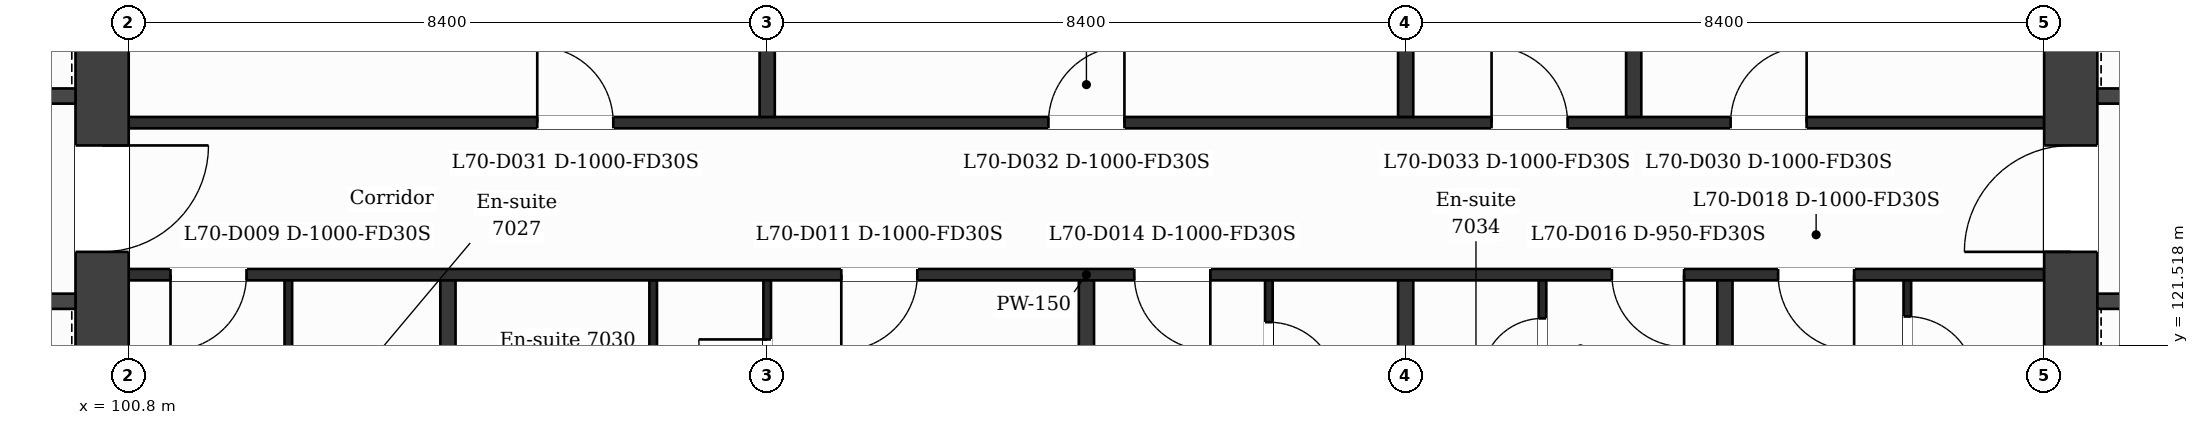
"""IFC4 building model, lengths in metres.
Left out: names, types, materials, properties, quantities, classifications, styles, units other than length and angle.
Written with IfcOpenShell. Run it as: python <this file> out.ifc"""

import sys

from ifc_helpers import new_model, si_unit, direction, frame, frame_2d, origin, place, context, subcontext, project, spatial, rectangle, extrude, element, fill, save


model = new_model("IFC4")
c1 = context("Model", 3, precision=1e-05, world=origin(), true_north=direction((0.0, 1.0)))
c2 = subcontext(c1, "Body", "Model", "MODEL_VIEW")
j1 = project(units=[si_unit("LENGTHUNIT", "METRE"), si_unit("PLANEANGLEUNIT", "RADIAN")], contexts=[c1])
p1 = place(None, origin())
s1 = spatial("IfcSite", under=j1, at=p1, CompositionType="ELEMENT")
p2 = place(p1, origin())
s2 = spatial("IfcBuilding", under=s1, at=p2, CompositionType="ELEMENT")
p3 = place(p2, frame((0.0, 0.0, 288.6)))
s3 = spatial("IfcBuildingStorey", under=s2, at=p3, CompositionType="ELEMENT", Elevation=288.6)
p4 = place(p3, frame((100.45, 132.05, 0.0), z_axis=(0.0, 0.0, 1.0), x_axis=(0.0, -1.0, 0.0)))
e1 = element("IfcWall", 1, at=p4, inside=s3, PredefinedType="SHEAR", context=c2, shape_type="SweptSolid", body=[
    extrude(rectangle(XDim=15.7, YDim=0.7, at=frame_2d((7.85, 0.0))), origin(), (0.0, 0.0, 1.0), 3.7),
])
p5 = place(p4, frame((7.9, 0.0, 0.0)))
e2 = element("IfcOpeningElement", 2, at=p5, cuts=e1, PredefinedType="OPENING", context=c2, shape_type="SweptSolid", body=[
    extrude(rectangle(XDim=1.4, YDim=2.1, at=frame_2d((0.7, 1.05))), frame((0.0, 0.36, 0.0), z_axis=(0.0, -1.0, 0.0), x_axis=(1.0, 0.0, 0.0)), (0.0, 0.0, 1.0), 0.72),
])
p6 = place(p3, frame((126.35, 116.35, 0.0), z_axis=(0.0, 0.0, 1.0), x_axis=(0.0, 1.0, 0.0)))
e3 = element("IfcWall", 3, at=p6, inside=s3, PredefinedType="SHEAR", context=c2, shape_type="SweptSolid", body=[
    extrude(rectangle(XDim=15.7, YDim=0.7, at=frame_2d((7.85, 0.0))), origin(), (0.0, 0.0, 1.0), 3.7),
])
p7 = place(p6, frame((6.4, 0.0, 0.0)))
e4 = element("IfcOpeningElement", 4, at=p7, cuts=e3, PredefinedType="OPENING", context=c2, shape_type="SweptSolid", body=[
    extrude(rectangle(XDim=1.4, YDim=2.1, at=frame_2d((0.7, 1.05))), frame((0.0, 0.36, 0.0), z_axis=(0.0, -1.0, 0.0), x_axis=(1.0, 0.0, 0.0)), (0.0, 0.0, 1.0), 0.72),
])
p8 = place(p3, frame((95.227, 122.1, 0.0), z_axis=(0.0, 0.0, 1.0), x_axis=(1.0, 0.0, 0.0)))
e5 = element("IfcWall", 5, at=p8, inside=s3, PredefinedType="PARTITIONING", context=c2, shape_type="SweptSolid", body=[
    extrude(rectangle(XDim=4.873, YDim=0.2, at=frame_2d((2.437, 0.0))), origin(), (0.0, 0.0, 1.0), 3.38),
])
p9 = place(p8, frame((0.605, 0.0, 0.0)))
e6 = element("IfcOpeningElement", 6, at=p9, cuts=e5, PredefinedType="OPENING", context=c2, shape_type="SweptSolid", body=[
    extrude(rectangle(XDim=1.1, YDim=2.1, at=frame_2d((0.55, 1.05))), frame((0.0, 0.11, 0.0), z_axis=(0.0, -1.0, 0.0), x_axis=(1.0, 0.0, 0.0)), (0.0, 0.0, 1.0), 0.22),
])
p10 = place(p8, frame((2.946, 0.0, 0.0)))
e7 = element("IfcOpeningElement", 7, at=p10, cuts=e5, PredefinedType="OPENING", context=c2, shape_type="SweptSolid", body=[
    extrude(rectangle(XDim=1.1, YDim=2.1, at=frame_2d((0.55, 1.05))), frame((0.0, 0.11, 0.0), z_axis=(0.0, -1.0, 0.0), x_axis=(1.0, 0.0, 0.0)), (0.0, 0.0, 1.0), 0.22),
])
p11 = place(p3, frame((126.7, 122.1, 0.0), z_axis=(0.0, 0.0, 1.0), x_axis=(1.0, 0.0, 0.0)))
e8 = element("IfcWall", 8, at=p11, inside=s3, PredefinedType="PARTITIONING", context=c2, shape_type="SweptSolid", body=[
    extrude(rectangle(XDim=4.873, YDim=0.2, at=frame_2d((2.437, 0.0))), origin(), (0.0, 0.0, 1.0), 3.38),
])
p12 = place(p11, frame((3.105, 0.0, 0.0)))
e9 = element("IfcOpeningElement", 9, at=p12, cuts=e8, PredefinedType="OPENING", context=c2, shape_type="SweptSolid", body=[
    extrude(rectangle(XDim=1.1, YDim=2.1, at=frame_2d((0.55, 1.05))), frame((0.0, 0.11, 0.0), z_axis=(0.0, -1.0, 0.0), x_axis=(1.0, 0.0, 0.0)), (0.0, 0.0, 1.0), 0.22),
])
p13 = place(p11, frame((0.732, 0.0, 0.0)))
e10 = element("IfcOpeningElement", 10, at=p13, cuts=e8, PredefinedType="OPENING", context=c2, shape_type="SweptSolid", body=[
    extrude(rectangle(XDim=1.1, YDim=2.1, at=frame_2d((0.55, 1.05))), frame((0.0, 0.11, 0.0), z_axis=(0.0, -1.0, 0.0), x_axis=(1.0, 0.0, 0.0)), (0.0, 0.0, 1.0), 0.22),
])
p14 = place(p3, frame((100.8, 122.45, 0.0), z_axis=(0.0, 0.0, 1.0), x_axis=(1.0, 0.0, 0.0)))
e11 = element("IfcWall", 11, at=p14, inside=s3, PredefinedType="PARTITIONING", context=c2, shape_type="SweptSolid", body=[
    extrude(rectangle(XDim=25.2, YDim=0.15, at=frame_2d((12.6, 0.0))), origin(), (0.0, 0.0, 1.0), 3.38),
])
p15 = place(p14, frame((0.55, 0.0, 0.0)))
e12 = element("IfcOpeningElement", 12, at=p15, cuts=e11, PredefinedType="OPENING", context=c2, shape_type="SweptSolid", body=[
    extrude(rectangle(XDim=1.0, YDim=2.1, at=frame_2d((0.5, 1.05))), frame((0.0, 0.085, 0.0), z_axis=(0.0, -1.0, 0.0), x_axis=(1.0, 0.0, 0.0)), (0.0, 0.0, 1.0), 0.17),
])
p16 = place(p14, frame((9.375, 0.0, 0.0)))
e13 = element("IfcOpeningElement", 13, at=p16, cuts=e11, PredefinedType="OPENING", context=c2, shape_type="SweptSolid", body=[
    extrude(rectangle(XDim=1.0, YDim=2.1, at=frame_2d((0.5, 1.05))), frame((0.0, 0.085, 0.0), z_axis=(0.0, -1.0, 0.0), x_axis=(1.0, 0.0, 0.0)), (0.0, 0.0, 1.0), 0.17),
])
p17 = place(p14, frame((13.23, 0.0, 0.0)))
e14 = element("IfcOpeningElement", 14, at=p17, cuts=e11, PredefinedType="OPENING", context=c2, shape_type="SweptSolid", body=[
    extrude(rectangle(XDim=1.0, YDim=2.1, at=frame_2d((0.5, 1.05))), frame((0.0, 0.085, 0.0), z_axis=(0.0, -1.0, 0.0), x_axis=(1.0, 0.0, 0.0)), (0.0, 0.0, 1.0), 0.17),
])
p18 = place(p14, frame((19.513, 0.0, 0.0)))
e15 = element("IfcOpeningElement", 15, at=p18, cuts=e11, PredefinedType="OPENING", context=c2, shape_type="SweptSolid", body=[
    extrude(rectangle(XDim=0.95, YDim=2.1, at=frame_2d((0.475, 1.05))), frame((0.0, 0.085, 0.0), z_axis=(0.0, -1.0, 0.0), x_axis=(1.0, 0.0, 0.0)), (0.0, 0.0, 1.0), 0.17),
])
p19 = place(p14, frame((21.7, 0.0, 0.0)))
e16 = element("IfcOpeningElement", 16, at=p19, cuts=e11, PredefinedType="OPENING", context=c2, shape_type="SweptSolid", body=[
    extrude(rectangle(XDim=1.0, YDim=2.1, at=frame_2d((0.5, 1.05))), frame((0.0, 0.085, 0.0), z_axis=(0.0, -1.0, 0.0), x_axis=(1.0, 0.0, 0.0)), (0.0, 0.0, 1.0), 0.17),
])
p20 = place(p3, frame((100.8, 124.45, 0.0), z_axis=(0.0, 0.0, 1.0), x_axis=(1.0, 0.0, 0.0)))
e17 = element("IfcWall", 17, at=p20, inside=s3, PredefinedType="PARTITIONING", context=c2, shape_type="SweptSolid", body=[
    extrude(rectangle(XDim=25.2, YDim=0.15, at=frame_2d((12.6, 0.0))), origin(), (0.0, 0.0, 1.0), 3.38),
])
p21 = place(p20, frame((21.075, 0.0, 0.0)))
e18 = element("IfcOpeningElement", 18, at=p21, cuts=e17, PredefinedType="OPENING", context=c2, shape_type="SweptSolid", body=[
    extrude(rectangle(XDim=1.0, YDim=2.1, at=frame_2d((0.5, 1.05))), frame((0.0, 0.085, 0.0), z_axis=(0.0, -1.0, 0.0), x_axis=(1.0, 0.0, 0.0)), (0.0, 0.0, 1.0), 0.17),
])
p22 = place(p20, frame((5.375, 0.0, 0.0)))
e19 = element("IfcOpeningElement", 19, at=p22, cuts=e17, PredefinedType="OPENING", context=c2, shape_type="SweptSolid", body=[
    extrude(rectangle(XDim=1.0, YDim=2.1, at=frame_2d((0.5, 1.05))), frame((0.0, 0.085, 0.0), z_axis=(0.0, -1.0, 0.0), x_axis=(1.0, 0.0, 0.0)), (0.0, 0.0, 1.0), 0.17),
])
p23 = place(p20, frame((12.1, 0.0, 0.0)))
e20 = element("IfcOpeningElement", 20, at=p23, cuts=e17, PredefinedType="OPENING", context=c2, shape_type="SweptSolid", body=[
    extrude(rectangle(XDim=1.0, YDim=2.1, at=frame_2d((0.5, 1.05))), frame((0.0, 0.085, 0.0), z_axis=(0.0, -1.0, 0.0), x_axis=(1.0, 0.0, 0.0)), (0.0, 0.0, 1.0), 0.17),
])
p24 = place(p20, frame((17.93, 0.0, 0.0)))
e21 = element("IfcOpeningElement", 21, at=p24, cuts=e17, PredefinedType="OPENING", context=c2, shape_type="SweptSolid", body=[
    extrude(rectangle(XDim=1.0, YDim=2.1, at=frame_2d((0.5, 1.05))), frame((0.0, 0.085, 0.0), z_axis=(0.0, -1.0, 0.0), x_axis=(1.0, 0.0, 0.0)), (0.0, 0.0, 1.0), 0.17),
])
p25 = place(p3, frame((92.702, 124.8, 0.0), z_axis=(0.0, 0.0, 1.0), x_axis=(1.0, 0.0, 0.0)))
e22 = element("IfcWall", 22, at=p25, inside=s3, PredefinedType="PARTITIONING", context=c2, shape_type="SweptSolid", body=[
    extrude(rectangle(XDim=7.398, YDim=0.2, at=frame_2d((3.699, 0.0))), origin(), (0.0, 0.0, 1.0), 3.38),
])
p26 = place(p25, frame((5.573, 0.0, 0.0)))
e23 = element("IfcOpeningElement", 23, at=p26, cuts=e22, PredefinedType="OPENING", context=c2, shape_type="SweptSolid", body=[
    extrude(rectangle(XDim=1.1, YDim=2.1, at=frame_2d((0.55, 1.05))), frame((0.0, 0.11, 0.0), z_axis=(0.0, -1.0, 0.0), x_axis=(1.0, 0.0, 0.0)), (0.0, 0.0, 1.0), 0.22),
])
p27 = place(p3, frame((126.7, 124.8, 0.0), z_axis=(0.0, 0.0, 1.0), x_axis=(1.0, 0.0, 0.0)))
e24 = element("IfcWall", 24, at=p27, inside=s3, PredefinedType="PARTITIONING", context=c2, shape_type="SweptSolid", body=[
    extrude(rectangle(XDim=4.849, YDim=0.2, at=frame_2d((2.424, 0.0))), origin(), (0.0, 0.0, 1.0), 3.38),
])
p28 = place(p27, frame((0.725, 0.0, 0.0)))
e25 = element("IfcOpeningElement", 25, at=p28, cuts=e24, PredefinedType="OPENING", context=c2, shape_type="SweptSolid", body=[
    extrude(rectangle(XDim=1.1, YDim=2.1, at=frame_2d((0.55, 1.05))), frame((0.0, 0.11, 0.0), z_axis=(0.0, -1.0, 0.0), x_axis=(1.0, 0.0, 0.0)), (0.0, 0.0, 1.0), 0.22),
])
p29 = place(p3, frame((102.9, 120.1, 0.0), z_axis=(0.0, 0.0, 1.0), x_axis=(0.0, 1.0, 0.0)))
e26 = element("IfcWall", 26, at=p29, inside=s3, PredefinedType="PARTITIONING", context=c2, shape_type="SweptSolid", body=[
    extrude(rectangle(XDim=2.275, YDim=0.1, at=frame_2d((1.137, 0.0))), origin(), (0.0, 0.0, 1.0), 3.38),
])
p30 = place(p29, frame((0.5, 0.0, 0.0)))
e27 = element("IfcOpeningElement", 27, at=p30, cuts=e26, PredefinedType="OPENING", context=c2, shape_type="SweptSolid", body=[
    extrude(rectangle(XDim=0.9, YDim=2.1, at=frame_2d((0.45, 1.05))), frame((0.0, 0.06, 0.0), z_axis=(0.0, -1.0, 0.0), x_axis=(1.0, 0.0, 0.0)), (0.0, 0.0, 1.0), 0.12),
])
p31 = place(p3, frame((105.0, 117.79, 0.0), z_axis=(0.0, 0.0, 1.0), x_axis=(0.0, 1.0, 0.0)))
e28 = element("IfcWall", 28, at=p31, inside=s3, PredefinedType="PARTITIONING", context=c2, shape_type="SweptSolid", body=[
    extrude(rectangle(XDim=4.585, YDim=0.2, at=frame_2d((2.292, 0.0))), origin(), (0.0, 0.0, 1.0), 3.38),
])
p32 = place(p3, frame((107.7, 120.1, 0.0), z_axis=(0.0, 0.0, 1.0), x_axis=(0.0, 1.0, 0.0)))
e29 = element("IfcWall", 29, at=p32, inside=s3, PredefinedType="PARTITIONING", context=c2, shape_type="SweptSolid", body=[
    extrude(rectangle(XDim=2.275, YDim=0.1, at=frame_2d((1.137, 0.0))), origin(), (0.0, 0.0, 1.0), 3.38),
])
p33 = place(p3, frame((109.2, 117.79, 0.0), z_axis=(0.0, 0.0, 1.0), x_axis=(0.0, 1.0, 0.0)))
e30 = element("IfcWall", 30, at=p33, inside=s3, PredefinedType="PARTITIONING", context=c2, shape_type="SweptSolid", body=[
    extrude(rectangle(XDim=4.585, YDim=0.1, at=frame_2d((2.292, 0.0))), origin(), (0.0, 0.0, 1.0), 3.38),
])
p34 = place(p33, frame((2.908, 0.0, 0.0)))
e31 = element("IfcOpeningElement", 31, at=p34, cuts=e30, PredefinedType="OPENING", context=c2, shape_type="SweptSolid", body=[
    extrude(rectangle(XDim=0.9, YDim=2.1, at=frame_2d((0.45, 1.05))), frame((0.0, 0.06, 0.0), z_axis=(0.0, -1.0, 0.0), x_axis=(1.0, 0.0, 0.0)), (0.0, 0.0, 1.0), 0.12),
])
p35 = place(p3, frame((109.2, 124.525, 0.0), z_axis=(0.0, 0.0, 1.0), x_axis=(0.0, 1.0, 0.0)))
e32 = element("IfcWall", 32, at=p35, inside=s3, PredefinedType="PARTITIONING", context=c2, shape_type="SweptSolid", body=[
    extrude(rectangle(XDim=9.2, YDim=0.2, at=frame_2d((4.6, 0.0))), origin(), (0.0, 0.0, 1.0), 3.38),
])
p36 = place(p3, frame((113.4, 117.79, 0.0), z_axis=(0.0, 0.0, 1.0), x_axis=(0.0, 1.0, 0.0)))
e33 = element("IfcWall", 33, at=p36, inside=s3, PredefinedType="PARTITIONING", context=c2, shape_type="SweptSolid", body=[
    extrude(rectangle(XDim=4.585, YDim=0.2, at=frame_2d((2.292, 0.0))), origin(), (0.0, 0.0, 1.0), 3.38),
])
p37 = place(p3, frame((115.8, 119.8, 0.0), z_axis=(0.0, 0.0, 1.0), x_axis=(0.0, 1.0, 0.0)))
e34 = element("IfcWall", 34, at=p37, inside=s3, PredefinedType="PARTITIONING", context=c2, shape_type="SweptSolid", body=[
    extrude(rectangle(XDim=2.575, YDim=0.1, at=frame_2d((1.288, 0.0))), origin(), (0.0, 0.0, 1.0), 3.38),
])
p38 = place(p37, frame((1.125, 0.0, 0.0)))
e35 = element("IfcOpeningElement", 35, at=p38, cuts=e34, PredefinedType="OPENING", context=c2, shape_type="SweptSolid", body=[
    extrude(rectangle(XDim=0.9, YDim=2.1, at=frame_2d((0.45, 1.05))), frame((0.0, 0.06, 0.0), z_axis=(0.0, -1.0, 0.0), x_axis=(1.0, 0.0, 0.0)), (0.0, 0.0, 1.0), 0.12),
])
p39 = place(p3, frame((117.6, 117.79, 0.0), z_axis=(0.0, 0.0, 1.0), x_axis=(0.0, 1.0, 0.0)))
e36 = element("IfcWall", 36, at=p39, inside=s3, PredefinedType="PARTITIONING", context=c2, shape_type="SweptSolid", body=[
    extrude(rectangle(XDim=4.585, YDim=0.2, at=frame_2d((2.292, 0.0))), origin(), (0.0, 0.0, 1.0), 3.38),
])
p40 = place(p3, frame((117.6, 124.525, 0.0), z_axis=(0.0, 0.0, 1.0), x_axis=(0.0, 1.0, 0.0)))
e37 = element("IfcWall", 37, at=p40, inside=s3, PredefinedType="PARTITIONING", context=c2, shape_type="SweptSolid", body=[
    extrude(rectangle(XDim=9.2, YDim=0.2, at=frame_2d((4.6, 0.0))), origin(), (0.0, 0.0, 1.0), 3.38),
])
p41 = place(p3, frame((119.4, 120.1, 0.0), z_axis=(0.0, 0.0, 1.0), x_axis=(0.0, 1.0, 0.0)))
e38 = element("IfcWall", 38, at=p41, inside=s3, PredefinedType="PARTITIONING", context=c2, shape_type="SweptSolid", body=[
    extrude(rectangle(XDim=2.275, YDim=0.1, at=frame_2d((1.137, 0.0))), origin(), (0.0, 0.0, 1.0), 3.38),
])
p42 = place(p41, frame((0.975, 0.0, 0.0)))
e39 = element("IfcOpeningElement", 39, at=p42, cuts=e38, PredefinedType="OPENING", context=c2, shape_type="SweptSolid", body=[
    extrude(rectangle(XDim=0.8, YDim=2.1, at=frame_2d((0.4, 1.05))), frame((0.0, 0.06, 0.0), z_axis=(0.0, -1.0, 0.0), x_axis=(1.0, 0.0, 0.0)), (0.0, 0.0, 1.0), 0.12),
])
p43 = place(p3, frame((120.6, 124.525, 0.0), z_axis=(0.0, 0.0, 1.0), x_axis=(0.0, 1.0, 0.0)))
e40 = element("IfcWall", 40, at=p43, inside=s3, PredefinedType="PARTITIONING", context=c2, shape_type="SweptSolid", body=[
    extrude(rectangle(XDim=5.825, YDim=0.2, at=frame_2d((2.913, 0.0))), origin(), (0.0, 0.0, 1.0), 3.38),
])
p44 = place(p3, frame((121.8, 117.79, 0.0), z_axis=(0.0, 0.0, 1.0), x_axis=(0.0, 1.0, 0.0)))
e41 = element("IfcWall", 41, at=p44, inside=s3, PredefinedType="PARTITIONING", context=c2, shape_type="SweptSolid", body=[
    extrude(rectangle(XDim=4.585, YDim=0.2, at=frame_2d((2.292, 0.0))), origin(), (0.0, 0.0, 1.0), 3.38),
])
p45 = place(p3, frame((124.2, 120.1, 0.0), z_axis=(0.0, 0.0, 1.0), x_axis=(0.0, 1.0, 0.0)))
e42 = element("IfcWall", 42, at=p45, inside=s3, PredefinedType="PARTITIONING", context=c2, shape_type="SweptSolid", body=[
    extrude(rectangle(XDim=2.275, YDim=0.1, at=frame_2d((1.137, 0.0))), origin(), (0.0, 0.0, 1.0), 3.38),
])
p46 = place(p45, frame((0.9, 0.0, 0.0)))
e43 = element("IfcOpeningElement", 43, at=p46, cuts=e42, PredefinedType="OPENING", context=c2, shape_type="SweptSolid", body=[
    extrude(rectangle(XDim=0.9, YDim=2.1, at=frame_2d((0.45, 1.05))), frame((0.0, 0.06, 0.0), z_axis=(0.0, -1.0, 0.0), x_axis=(1.0, 0.0, 0.0)), (0.0, 0.0, 1.0), 0.12),
])
p47 = place(p15, origin())
e44 = element("IfcDoor", 44, at=p47, inside=s3, OperationType="SINGLE_SWING_LEFT", PredefinedType="DOOR", context=c2, shape_type="SweptSolid", body=[
    extrude(rectangle(XDim=1.0, YDim=2.1, at=frame_2d((0.5, 1.05))), frame((0.0, 0.025, 0.0), z_axis=(0.0, -1.0, 0.0), x_axis=(1.0, 0.0, 0.0)), (0.0, 0.0, 1.0), 0.05),
])
fill(e12, e44)
p48 = place(p16, origin())
e45 = element("IfcDoor", 45, at=p48, inside=s3, OperationType="SINGLE_SWING_LEFT", PredefinedType="DOOR", context=c2, shape_type="SweptSolid", body=[
    extrude(rectangle(XDim=1.0, YDim=2.1, at=frame_2d((0.5, 1.05))), frame((0.0, 0.025, 0.0), z_axis=(0.0, -1.0, 0.0), x_axis=(1.0, 0.0, 0.0)), (0.0, 0.0, 1.0), 0.05),
])
fill(e13, e45)
p49 = place(p34, origin())
e46 = element("IfcDoor", 46, at=p49, inside=s3, OperationType="SINGLE_SWING_RIGHT", PredefinedType="DOOR", context=c2, shape_type="SweptSolid", body=[
    extrude(rectangle(XDim=0.9, YDim=2.1, at=frame_2d((0.45, 1.05))), frame((0.0, 0.025, 0.0), z_axis=(0.0, -1.0, 0.0), x_axis=(1.0, 0.0, 0.0)), (0.0, 0.0, 1.0), 0.05),
])
fill(e31, e46)
p50 = place(p17, origin())
e47 = element("IfcDoor", 47, at=p50, inside=s3, OperationType="SINGLE_SWING_RIGHT", PredefinedType="DOOR", context=c2, shape_type="SweptSolid", body=[
    extrude(rectangle(XDim=1.0, YDim=2.1, at=frame_2d((0.5, 1.05))), frame((0.0, 0.025, 0.0), z_axis=(0.0, -1.0, 0.0), x_axis=(1.0, 0.0, 0.0)), (0.0, 0.0, 1.0), 0.05),
])
fill(e14, e47)
p51 = place(p38, origin())
e48 = element("IfcDoor", 48, at=p51, inside=s3, OperationType="SINGLE_SWING_LEFT", PredefinedType="DOOR", context=c2, shape_type="SweptSolid", body=[
    extrude(rectangle(XDim=0.9, YDim=2.1, at=frame_2d((0.45, 1.05))), frame((0.0, 0.025, 0.0), z_axis=(0.0, -1.0, 0.0), x_axis=(1.0, 0.0, 0.0)), (0.0, 0.0, 1.0), 0.05),
])
fill(e35, e48)
p52 = place(p18, origin())
e49 = element("IfcDoor", 49, at=p52, inside=s3, OperationType="SINGLE_SWING_RIGHT", PredefinedType="DOOR", context=c2, shape_type="SweptSolid", body=[
    extrude(rectangle(XDim=0.95, YDim=2.1, at=frame_2d((0.475, 1.05))), frame((0.0, 0.025, 0.0), z_axis=(0.0, -1.0, 0.0), x_axis=(1.0, 0.0, 0.0)), (0.0, 0.0, 1.0), 0.05),
])
fill(e15, e49)
p53 = place(p42, origin())
e50 = element("IfcDoor", 50, at=p53, inside=s3, OperationType="SINGLE_SWING_LEFT", PredefinedType="DOOR", context=c2, shape_type="SweptSolid", body=[
    extrude(rectangle(XDim=0.8, YDim=2.1, at=frame_2d((0.4, 1.05))), frame((0.0, 0.025, 0.0), z_axis=(0.0, -1.0, 0.0), x_axis=(1.0, 0.0, 0.0)), (0.0, 0.0, 1.0), 0.05),
])
fill(e39, e50)
p54 = place(p19, origin())
e51 = element("IfcDoor", 51, at=p54, inside=s3, OperationType="SINGLE_SWING_RIGHT", PredefinedType="DOOR", context=c2, shape_type="SweptSolid", body=[
    extrude(rectangle(XDim=1.0, YDim=2.1, at=frame_2d((0.5, 1.05))), frame((0.0, 0.025, 0.0), z_axis=(0.0, -1.0, 0.0), x_axis=(1.0, 0.0, 0.0)), (0.0, 0.0, 1.0), 0.05),
])
fill(e16, e51)
p55 = place(p46, origin())
e52 = element("IfcDoor", 52, at=p55, inside=s3, OperationType="SINGLE_SWING_LEFT", PredefinedType="DOOR", context=c2, shape_type="SweptSolid", body=[
    extrude(rectangle(XDim=0.9, YDim=2.1, at=frame_2d((0.45, 1.05))), frame((0.0, 0.025, 0.0), z_axis=(0.0, -1.0, 0.0), x_axis=(1.0, 0.0, 0.0)), (0.0, 0.0, 1.0), 0.05),
])
fill(e43, e52)
p56 = place(p21, origin())
e53 = element("IfcDoor", 53, at=p56, inside=s3, OperationType="SINGLE_SWING_RIGHT", PredefinedType="DOOR", context=c2, shape_type="SweptSolid", body=[
    extrude(rectangle(XDim=1.0, YDim=2.1, at=frame_2d((0.5, 1.05))), frame((0.0, 0.025, 0.0), z_axis=(0.0, -1.0, 0.0), x_axis=(1.0, 0.0, 0.0)), (0.0, 0.0, 1.0), 0.05),
])
fill(e18, e53)
p57 = place(p22, origin())
e54 = element("IfcDoor", 54, at=p57, inside=s3, OperationType="SINGLE_SWING_LEFT", PredefinedType="DOOR", context=c2, shape_type="SweptSolid", body=[
    extrude(rectangle(XDim=1.0, YDim=2.1, at=frame_2d((0.5, 1.05))), frame((0.0, 0.025, 0.0), z_axis=(0.0, -1.0, 0.0), x_axis=(1.0, 0.0, 0.0)), (0.0, 0.0, 1.0), 0.05),
])
fill(e19, e54)
p58 = place(p23, origin())
e55 = element("IfcDoor", 55, at=p58, inside=s3, OperationType="SINGLE_SWING_RIGHT", PredefinedType="DOOR", context=c2, shape_type="SweptSolid", body=[
    extrude(rectangle(XDim=1.0, YDim=2.1, at=frame_2d((0.5, 1.05))), frame((0.0, 0.025, 0.0), z_axis=(0.0, -1.0, 0.0), x_axis=(1.0, 0.0, 0.0)), (0.0, 0.0, 1.0), 0.05),
])
fill(e20, e55)
p59 = place(p24, origin())
e56 = element("IfcDoor", 56, at=p59, inside=s3, OperationType="SINGLE_SWING_LEFT", PredefinedType="DOOR", context=c2, shape_type="SweptSolid", body=[
    extrude(rectangle(XDim=1.0, YDim=2.1, at=frame_2d((0.5, 1.05))), frame((0.0, 0.025, 0.0), z_axis=(0.0, -1.0, 0.0), x_axis=(1.0, 0.0, 0.0)), (0.0, 0.0, 1.0), 0.05),
])
fill(e21, e56)
p60 = place(p5, origin())
e57 = element("IfcDoor", 57, at=p60, inside=s3, OperationType="SINGLE_SWING_LEFT", PredefinedType="DOOR", context=c2, shape_type="SweptSolid", body=[
    extrude(rectangle(XDim=1.4, YDim=2.1, at=frame_2d((0.7, 1.05))), frame((0.0, 0.025, 0.0), z_axis=(0.0, -1.0, 0.0), x_axis=(1.0, 0.0, 0.0)), (0.0, 0.0, 1.0), 0.05),
])
fill(e2, e57)
p61 = place(p7, origin())
e58 = element("IfcDoor", 58, at=p61, inside=s3, OperationType="SINGLE_SWING_LEFT", PredefinedType="DOOR", context=c2, shape_type="SweptSolid", body=[
    extrude(rectangle(XDim=1.4, YDim=2.1, at=frame_2d((0.7, 1.05))), frame((0.0, 0.025, 0.0), z_axis=(0.0, -1.0, 0.0), x_axis=(1.0, 0.0, 0.0)), (0.0, 0.0, 1.0), 0.05),
])
fill(e4, e58)
save(model, sys.argv[1])
